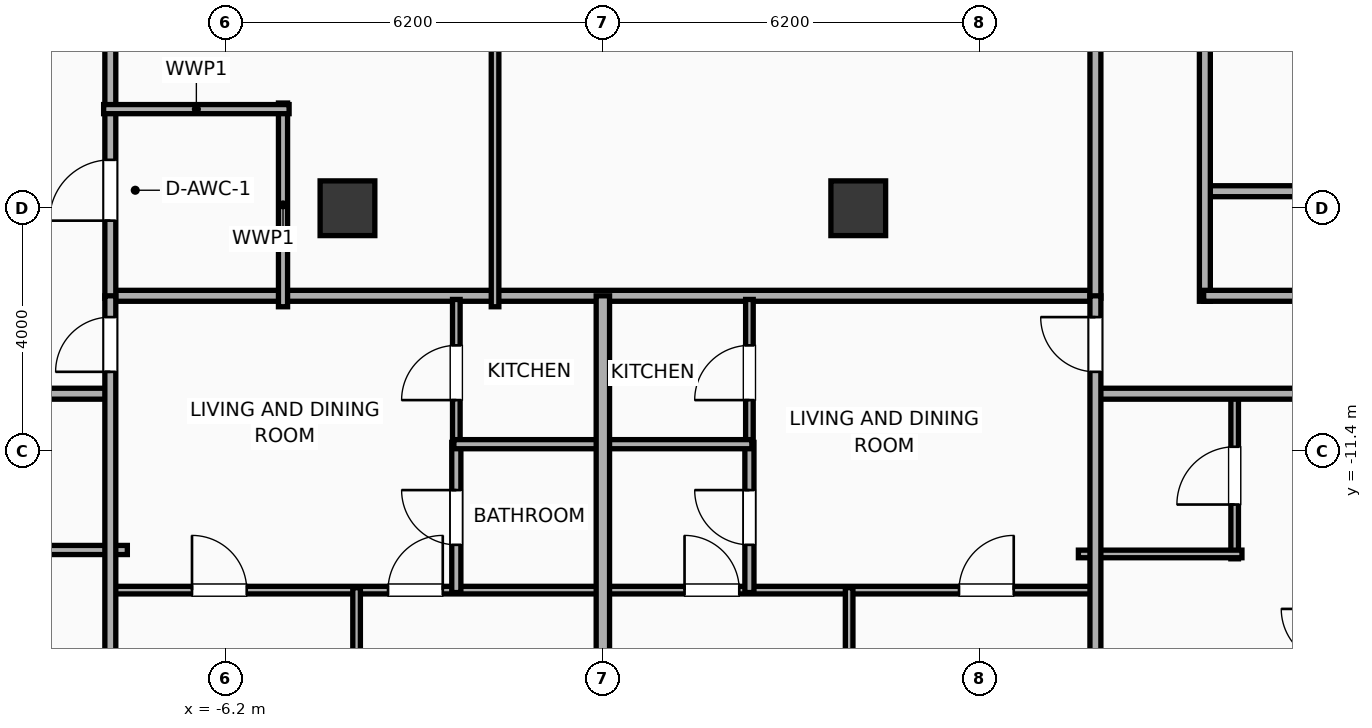
"""IFC4 building model, lengths in metres.
Left out: names, types, materials, properties, quantities, classifications, styles, units other than length and angle.
Written with IfcOpenShell. Run it as: python <this file> out.ifc"""

import sys

from ifc_helpers import new_model, si_unit, direction, frame, frame_2d, origin, origin_2d, place, context, subcontext, project, spatial, rectangle, extrude, element, fill, save


model = new_model("IFC4")
c1 = context("Model", 3, precision=1e-05, world=origin(), true_north=direction((0.0, 1.0)))
c2 = subcontext(c1, "Body", "Model", "MODEL_VIEW")
j1 = project(units=[si_unit("LENGTHUNIT", "METRE"), si_unit("PLANEANGLEUNIT", "RADIAN")], contexts=[c1])
p1 = place(None, origin())
s1 = spatial("IfcSite", under=j1, at=p1, CompositionType="ELEMENT")
p2 = place(p1, origin())
s2 = spatial("IfcBuilding", under=s1, at=p2, CompositionType="ELEMENT")
p3 = place(p2, frame((0.0, 0.0, 239.2)))
s3 = spatial("IfcBuildingStorey", under=s2, at=p3, CompositionType="ELEMENT", Elevation=239.2)
for number, where, z_axis, x_axis in (
    (1, (-4.2, -7.4, 0.0), (0.0, 0.0, 1.0), (1.0, 0.0, 0.0)),
    (2, (4.2, -7.4, 0.0), (0.0, 0.0, 1.0), (1.0, 0.0, 0.0)),
):
    element("IfcColumn", number, at=place(p3, frame(where, z_axis=z_axis, x_axis=x_axis)), inside=s3, PredefinedType="COLUMN", context=c2, shape_type="SweptSolid", body=[
        extrude(rectangle(XDim=0.9, YDim=0.9, at=origin_2d()), origin(), (0.0, 0.0, 1.0), 3.9),
    ])
p4 = place(p3, frame((9.88, -7.12, 0.0), z_axis=(0.0, 0.0, 1.0), x_axis=(1.0, 0.0, 0.0)))
e3 = element("IfcWall", 3, at=p4, inside=s3, PredefinedType="PARTITIONING", context=c2, shape_type="SweptSolid", body=[
    extrude(rectangle(XDim=2.27, YDim=0.18, at=frame_2d((1.135, 0.0))), origin(), (0.0, 0.0, 1.0), 3.65),
])
p5 = place(p3, frame((9.9, -8.93, 0.0), z_axis=(0.0, 0.0, 1.0), x_axis=(0.0, 1.0, 0.0)))
e4 = element("IfcWall", 4, at=p5, inside=s3, PredefinedType="PARTITIONING", context=c2, shape_type="SweptSolid", body=[
    extrude(rectangle(XDim=17.86, YDim=0.18, at=frame_2d((8.93, 0.0))), origin(), (0.0, 0.0, 1.0), 3.65),
])
p6 = place(p5, frame((7.487, 0.0, 0.0)))
e5 = element("IfcOpeningElement", 5, at=p6, cuts=e4, PredefinedType="OPENING", context=c2, shape_type="SweptSolid", body=[
    extrude(rectangle(XDim=1.1, YDim=2.05, at=frame_2d((0.55, 1.025))), frame((0.0, 0.1, 0.0), z_axis=(0.0, -1.0, 0.0), x_axis=(1.0, 0.0, 0.0)), (0.0, 0.0, 1.0), 0.2),
])
p7 = place(p3, frame((9.88, -8.84, 0.0), z_axis=(0.0, 0.0, 1.0), x_axis=(1.0, 0.0, 0.0)))
e6 = element("IfcWall", 6, at=p7, inside=s3, PredefinedType="PARTITIONING", context=c2, shape_type="SweptSolid", body=[
    extrude(rectangle(XDim=20.35, YDim=0.18, at=frame_2d((10.175, 0.0))), origin(), (0.0, 0.0, 1.0), 3.65),
])
p8 = place(p3, frame((-8.15, -8.84, 0.0), z_axis=(0.0, 0.0, 1.0), x_axis=(1.0, 0.0, 0.0)))
e7 = element("IfcWall", 7, at=p8, inside=s3, PredefinedType="PARTITIONING", context=c2, shape_type="SweptSolid", body=[
    extrude(rectangle(XDim=16.3, YDim=0.18, at=frame_2d((8.15, 0.0))), origin(), (0.0, 0.0, 1.0), 3.65),
])
p9 = place(p3, frame((-8.1, -8.88, 0.0), z_axis=(0.0, 0.0, 1.0), x_axis=(0.0, 1.0, 0.0)))
e8 = element("IfcWall", 8, at=p9, inside=s3, PredefinedType="PARTITIONING", context=c2, shape_type="SweptSolid", body=[
    extrude(rectangle(XDim=17.76, YDim=0.18, at=frame_2d((8.88, 0.0))), origin(), (0.0, 0.0, 1.0), 3.65),
])
p10 = place(p9, frame((1.276, 0.0, 0.0)))
e9 = element("IfcOpeningElement", 9, at=p10, cuts=e8, PredefinedType="OPENING", context=c2, shape_type="SweptSolid", body=[
    extrude(rectangle(XDim=1.0, YDim=2.05, at=frame_2d((0.5, 1.025))), frame((0.0, 0.1, 0.0), z_axis=(0.0, -1.0, 0.0), x_axis=(1.0, 0.0, 0.0)), (0.0, 0.0, 1.0), 0.2),
])
p11 = place(p9, frame((10.181, 0.0, 0.0)))
e10 = element("IfcOpeningElement", 10, at=p11, cuts=e8, PredefinedType="OPENING", context=c2, shape_type="SweptSolid", body=[
    extrude(rectangle(XDim=0.95, YDim=2.05, at=frame_2d((0.475, 1.025))), frame((0.0, 0.1, 0.0), z_axis=(0.0, -1.0, 0.0), x_axis=(1.0, 0.0, 0.0)), (0.0, 0.0, 1.0), 0.2),
])
p12 = place(p3, frame((8.1, -8.88, 0.0), z_axis=(0.0, 0.0, 1.0), x_axis=(0.0, 1.0, 0.0)))
e11 = element("IfcWall", 11, at=p12, inside=s3, PredefinedType="PARTITIONING", context=c2, shape_type="SweptSolid", body=[
    extrude(rectangle(XDim=17.76, YDim=0.18, at=frame_2d((8.88, 0.0))), origin(), (0.0, 0.0, 1.0), 3.65),
])
p13 = place(p3, frame((-5.26, -9.02, 0.0), z_axis=(0.0, 0.0, 1.0), x_axis=(0.0, 1.0, 0.0)))
e12 = element("IfcWall", 12, at=p13, inside=s3, PredefinedType="PLUMBINGWALL", context=c2, shape_type="SweptSolid", body=[
    extrude(rectangle(XDim=3.35, YDim=0.15, at=frame_2d((1.675, 0.0))), origin(), (0.0, 0.0, 1.0), 3.65),
])
p14 = place(p3, frame((-8.21, -5.77, 0.0), z_axis=(0.0, 0.0, 1.0), x_axis=(1.0, 0.0, 0.0)))
e13 = element("IfcWall", 13, at=p14, inside=s3, PredefinedType="PLUMBINGWALL", context=c2, shape_type="SweptSolid", body=[
    extrude(rectangle(XDim=3.05, YDim=0.15, at=frame_2d((1.525, 0.0))), origin(), (0.0, 0.0, 1.0), 3.65),
])
p15 = place(p3, frame((-1.773, -9.02, 0.0), z_axis=(0.0, 0.0, 1.0), x_axis=(0.0, 1.0, 0.0)))
e14 = element("IfcWall", 14, at=p15, inside=s3, PredefinedType="PARTITIONING", context=c2, shape_type="SweptSolid", body=[
    extrude(rectangle(XDim=17.99, YDim=0.125, at=frame_2d((8.995, 0.0))), origin(), (0.0, 0.0, 1.0), 3.65),
])
p16 = place(p15, frame((8.52, 0.0, 0.0)))
e15 = element("IfcOpeningElement", 15, at=p16, cuts=e14, PredefinedType="OPENING", context=c2, shape_type="SweptSolid", body=[
    extrude(rectangle(XDim=0.95, YDim=2.05, at=frame_2d((0.475, 1.025))), frame((0.0, 0.073, 0.0), z_axis=(0.0, -1.0, 0.0), x_axis=(1.0, 0.0, 0.0)), (0.0, 0.0, 1.0), 0.145),
])
p17 = place(p3, frame((-10.217, -13.02, 0.0), z_axis=(0.0, 0.0, 1.0), x_axis=(1.0, 0.0, 0.0)))
e16 = element("IfcWall", 16, at=p17, inside=s3, PredefinedType="PLUMBINGWALL", context=c2, shape_type="SweptSolid", body=[
    extrude(rectangle(XDim=2.397, YDim=0.15, at=frame_2d((1.198, 0.0))), origin(), (0.0, 0.0, 1.0), 3.65),
])
p18 = place(p3, frame((10.39, -13.165, 0.0), z_axis=(0.0, 0.0, 1.0), x_axis=(0.0, 1.0, 0.0)))
e17 = element("IfcWall", 17, at=p18, inside=s3, PredefinedType="PARTITIONING", context=c2, shape_type="SweptSolid", body=[
    extrude(rectangle(XDim=2.735, YDim=0.125, at=frame_2d((1.368, 0.0))), origin(), (0.0, 0.0, 1.0), 3.65),
])
p19 = place(p18, frame((0.893, 0.0, 0.0)))
e18 = element("IfcOpeningElement", 18, at=p19, cuts=e17, PredefinedType="OPENING", context=c2, shape_type="SweptSolid", body=[
    extrude(rectangle(XDim=0.95, YDim=2.05, at=frame_2d((0.475, 1.025))), frame((0.0, 0.073, 0.0), z_axis=(0.0, -1.0, 0.0), x_axis=(1.0, 0.0, 0.0)), (0.0, 0.0, 1.0), 0.145),
])
p20 = place(p3, frame((7.82, -13.085, 0.0), z_axis=(0.0, 0.0, 1.0), x_axis=(1.0, 0.0, 0.0)))
e19 = element("IfcWall", 19, at=p20, inside=s3, PredefinedType="PARTITIONING", context=c2, shape_type="SweptSolid", body=[
    extrude(rectangle(XDim=2.69, YDim=0.125, at=frame_2d((1.345, 0.0))), origin(), (0.0, 0.0, 1.0), 3.65),
])
p21 = place(p3, frame((-26.23, -10.45, 0.0), z_axis=(0.0, 0.0, 1.0), x_axis=(1.0, 0.0, 0.0)))
e20 = element("IfcWall", 20, at=p21, inside=s3, PredefinedType="PARTITIONING", context=c2, shape_type="SweptSolid", body=[
    extrude(rectangle(XDim=18.15, YDim=0.18, at=frame_2d((9.075, 0.0))), origin(), (0.0, 0.0, 1.0), 3.65),
])
p22 = place(p21, frame((2.659, 0.0, 0.0)))
e21 = element("IfcOpeningElement", 21, at=p22, cuts=e20, PredefinedType="OPENING", context=c2, shape_type="SweptSolid", body=[
    extrude(rectangle(XDim=0.9, YDim=2.05, at=frame_2d((0.45, 1.025))), frame((0.0, 0.1, 0.0), z_axis=(0.0, -1.0, 0.0), x_axis=(1.0, 0.0, 0.0)), (0.0, 0.0, 1.0), 0.2),
])
p23 = place(p21, frame((9.571, 0.0, 0.0)))
e22 = element("IfcOpeningElement", 22, at=p23, cuts=e20, PredefinedType="OPENING", context=c2, shape_type="SweptSolid", body=[
    extrude(rectangle(XDim=1.15, YDim=2.05, at=frame_2d((0.575, 1.025))), frame((0.0, 0.1, 0.0), z_axis=(0.0, -1.0, 0.0), x_axis=(1.0, 0.0, 0.0)), (0.0, 0.0, 1.0), 0.2),
])
p24 = place(p21, frame((14.792, 0.0, 0.0)))
e23 = element("IfcOpeningElement", 23, at=p24, cuts=e20, PredefinedType="OPENING", context=c2, shape_type="SweptSolid", body=[
    extrude(rectangle(XDim=0.9, YDim=2.05, at=frame_2d((0.45, 1.025))), frame((0.0, 0.1, 0.0), z_axis=(0.0, -1.0, 0.0), x_axis=(1.0, 0.0, 0.0)), (0.0, 0.0, 1.0), 0.2),
])
p25 = place(p3, frame((8.08, -10.45, 0.0), z_axis=(0.0, 0.0, 1.0), x_axis=(1.0, 0.0, 0.0)))
e24 = element("IfcWall", 24, at=p25, inside=s3, PredefinedType="PARTITIONING", context=c2, shape_type="SweptSolid", body=[
    extrude(rectangle(XDim=22.15, YDim=0.18, at=frame_2d((11.075, 0.0))), origin(), (0.0, 0.0, 1.0), 3.65),
])
p26 = place(p25, frame((3.283, 0.0, 0.0)))
e25 = element("IfcOpeningElement", 25, at=p26, cuts=e24, PredefinedType="OPENING", context=c2, shape_type="SweptSolid", body=[
    extrude(rectangle(XDim=1.15, YDim=2.05, at=frame_2d((0.575, 1.025))), frame((0.0, 0.1, 0.0), z_axis=(0.0, -1.0, 0.0), x_axis=(1.0, 0.0, 0.0)), (0.0, 0.0, 1.0), 0.2),
])
p27 = place(p25, frame((10.668, 0.0, 0.0)))
e26 = element("IfcOpeningElement", 26, at=p27, cuts=e24, PredefinedType="OPENING", context=c2, shape_type="SweptSolid", body=[
    extrude(rectangle(XDim=1.15, YDim=2.05, at=frame_2d((0.575, 1.025))), frame((0.0, 0.1, 0.0), z_axis=(0.0, -1.0, 0.0), x_axis=(1.0, 0.0, 0.0)), (0.0, 0.0, 1.0), 0.2),
])
p28 = place(p25, frame((18.084, 0.0, 0.0)))
e27 = element("IfcOpeningElement", 27, at=p28, cuts=e24, PredefinedType="OPENING", context=c2, shape_type="SweptSolid", body=[
    extrude(rectangle(XDim=1.15, YDim=2.05, at=frame_2d((0.575, 1.025))), frame((0.0, 0.1, 0.0), z_axis=(0.0, -1.0, 0.0), x_axis=(1.0, 0.0, 0.0)), (0.0, 0.0, 1.0), 0.2),
])
p29 = place(p3, frame((-8.08, -13.68, 0.0), z_axis=(0.0, 0.0, 1.0), x_axis=(1.0, 0.0, 0.0)))
e28 = element("IfcWall", 28, at=p29, inside=s3, PredefinedType="PARTITIONING", context=c2, shape_type="SweptSolid", body=[
    extrude(rectangle(XDim=8.06, YDim=0.125, at=frame_2d((4.03, 0.0))), origin(), (0.0, 0.0, 1.0), 3.65),
])
p30 = place(p29, frame((1.323, 0.0, 0.0)))
e29 = element("IfcOpeningElement", 29, at=p30, cuts=e28, PredefinedType="OPENING", context=c2, shape_type="SweptSolid", body=[
    extrude(rectangle(XDim=0.9, YDim=2.05, at=frame_2d((0.45, 1.025))), frame((0.0, 0.073, 0.0), z_axis=(0.0, -1.0, 0.0), x_axis=(1.0, 0.0, 0.0)), (0.0, 0.0, 1.0), 0.145),
])
p31 = place(p29, frame((4.547, 0.0, 0.0)))
e30 = element("IfcOpeningElement", 30, at=p31, cuts=e28, PredefinedType="OPENING", context=c2, shape_type="SweptSolid", body=[
    extrude(rectangle(XDim=0.9, YDim=2.05, at=frame_2d((0.45, 1.025))), frame((0.0, 0.073, 0.0), z_axis=(0.0, -1.0, 0.0), x_axis=(1.0, 0.0, 0.0)), (0.0, 0.0, 1.0), 0.145),
])
p32 = place(p3, frame((-2.41, -11.31, 0.0), z_axis=(0.0, 0.0, 1.0), x_axis=(0.0, 1.0, 0.0)))
e31 = element("IfcWall", 31, at=p32, inside=s3, PredefinedType="PARTITIONING", context=c2, shape_type="SweptSolid", body=[
    extrude(rectangle(XDim=2.41, YDim=0.125, at=frame_2d((1.205, 0.0))), origin(), (0.0, 0.0, 1.0), 3.65),
])
p33 = place(p32, frame((0.755, 0.0, 0.0)))
e32 = element("IfcOpeningElement", 32, at=p33, cuts=e31, PredefinedType="OPENING", context=c2, shape_type="SweptSolid", body=[
    extrude(rectangle(XDim=0.9, YDim=2.05, at=frame_2d((0.45, 1.025))), frame((0.0, 0.073, 0.0), z_axis=(0.0, -1.0, 0.0), x_axis=(1.0, 0.0, 0.0)), (0.0, 0.0, 1.0), 0.145),
])
p34 = place(p3, frame((-2.41, -13.72, 0.0), z_axis=(0.0, 0.0, 1.0), x_axis=(0.0, 1.0, 0.0)))
e33 = element("IfcWall", 33, at=p34, inside=s3, PredefinedType="PLUMBINGWALL", context=c2, shape_type="SweptSolid", body=[
    extrude(rectangle(XDim=2.47, YDim=0.15, at=frame_2d((1.235, 0.0))), origin(), (0.0, 0.0, 1.0), 3.65),
])
p35 = place(p34, frame((0.785, 0.0, 0.0)))
e34 = element("IfcOpeningElement", 34, at=p35, cuts=e33, PredefinedType="OPENING", context=c2, shape_type="SweptSolid", body=[
    extrude(rectangle(XDim=0.9, YDim=2.05, at=frame_2d((0.45, 1.025))), frame((0.0, 0.085, 0.0), z_axis=(0.0, -1.0, 0.0), x_axis=(1.0, 0.0, 0.0)), (0.0, 0.0, 1.0), 0.17),
])
p36 = place(p3, frame((-2.45, -11.28, 0.0), z_axis=(0.0, 0.0, 1.0), x_axis=(1.0, 0.0, 0.0)))
e35 = element("IfcWall", 35, at=p36, inside=s3, PredefinedType="PLUMBINGWALL", context=c2, shape_type="SweptSolid", body=[
    extrude(rectangle(XDim=2.43, YDim=0.15, at=frame_2d((1.215, 0.0))), origin(), (0.0, 0.0, 1.0), 3.65),
])
p37 = place(p3, frame((-4.05, -18.83, 0.0), z_axis=(0.0, 0.0, 1.0), x_axis=(0.0, 1.0, 0.0)))
e36 = element("IfcWall", 36, at=p37, inside=s3, PredefinedType="PARTITIONING", context=c2, shape_type="SweptSolid", body=[
    extrude(rectangle(XDim=5.19, YDim=0.125, at=frame_2d((2.595, 0.0))), origin(), (0.0, 0.0, 1.0), 3.65),
])
p38 = place(p3, frame((-8.1, -18.83, 0.0), z_axis=(0.0, 0.0, 1.0), x_axis=(0.0, 1.0, 0.0)))
e37 = element("IfcWall", 37, at=p38, inside=s3, PredefinedType="PARTITIONING", context=c2, shape_type="SweptSolid", body=[
    extrude(rectangle(XDim=9.99, YDim=0.18, at=frame_2d((4.995, 0.0))), origin(), (0.0, 0.0, 1.0), 3.65),
])
p39 = place(p38, frame((8.74, 0.0, 0.0)))
e38 = element("IfcOpeningElement", 38, at=p39, cuts=e37, PredefinedType="OPENING", context=c2, shape_type="SweptSolid", body=[
    extrude(rectangle(XDim=0.9, YDim=2.05, at=frame_2d((0.45, 1.025))), frame((0.0, 0.1, 0.0), z_axis=(0.0, -1.0, 0.0), x_axis=(1.0, 0.0, 0.0)), (0.0, 0.0, 1.0), 0.2),
])
p40 = place(p3, frame((0.02, -13.68, 0.0), z_axis=(0.0, 0.0, 1.0), x_axis=(1.0, 0.0, 0.0)))
e39 = element("IfcWall", 39, at=p40, inside=s3, PredefinedType="PARTITIONING", context=c2, shape_type="SweptSolid", body=[
    extrude(rectangle(XDim=8.06, YDim=0.125, at=frame_2d((4.03, 0.0))), origin(), (0.0, 0.0, 1.0), 3.65),
])
p41 = place(p40, frame((1.323, 0.0, 0.0)))
e40 = element("IfcOpeningElement", 40, at=p41, cuts=e39, PredefinedType="OPENING", context=c2, shape_type="SweptSolid", body=[
    extrude(rectangle(XDim=0.9, YDim=2.05, at=frame_2d((0.45, 1.025))), frame((0.0, 0.073, 0.0), z_axis=(0.0, -1.0, 0.0), x_axis=(1.0, 0.0, 0.0)), (0.0, 0.0, 1.0), 0.145),
])
p42 = place(p40, frame((5.837, 0.0, 0.0)))
e41 = element("IfcOpeningElement", 41, at=p42, cuts=e39, PredefinedType="OPENING", context=c2, shape_type="SweptSolid", body=[
    extrude(rectangle(XDim=0.9, YDim=2.05, at=frame_2d((0.45, 1.025))), frame((0.0, 0.073, 0.0), z_axis=(0.0, -1.0, 0.0), x_axis=(1.0, 0.0, 0.0)), (0.0, 0.0, 1.0), 0.145),
])
p43 = place(p3, frame((2.41, -11.31, 0.0), z_axis=(0.0, 0.0, 1.0), x_axis=(0.0, 1.0, 0.0)))
e42 = element("IfcWall", 42, at=p43, inside=s3, PredefinedType="PARTITIONING", context=c2, shape_type="SweptSolid", body=[
    extrude(rectangle(XDim=2.41, YDim=0.125, at=frame_2d((1.205, 0.0))), origin(), (0.0, 0.0, 1.0), 3.65),
])
p44 = place(p43, frame((0.755, 0.0, 0.0)))
e43 = element("IfcOpeningElement", 43, at=p44, cuts=e42, PredefinedType="OPENING", context=c2, shape_type="SweptSolid", body=[
    extrude(rectangle(XDim=0.9, YDim=2.05, at=frame_2d((0.45, 1.025))), frame((0.0, 0.073, 0.0), z_axis=(0.0, -1.0, 0.0), x_axis=(1.0, 0.0, 0.0)), (0.0, 0.0, 1.0), 0.145),
])
p45 = place(p3, frame((2.41, -13.72, 0.0), z_axis=(0.0, 0.0, 1.0), x_axis=(0.0, 1.0, 0.0)))
e44 = element("IfcWall", 44, at=p45, inside=s3, PredefinedType="PLUMBINGWALL", context=c2, shape_type="SweptSolid", body=[
    extrude(rectangle(XDim=2.47, YDim=0.15, at=frame_2d((1.235, 0.0))), origin(), (0.0, 0.0, 1.0), 3.65),
])
p46 = place(p45, frame((0.785, 0.0, 0.0)))
e45 = element("IfcOpeningElement", 45, at=p46, cuts=e44, PredefinedType="OPENING", context=c2, shape_type="SweptSolid", body=[
    extrude(rectangle(XDim=0.9, YDim=2.05, at=frame_2d((0.45, 1.025))), frame((0.0, 0.085, 0.0), z_axis=(0.0, -1.0, 0.0), x_axis=(1.0, 0.0, 0.0)), (0.0, 0.0, 1.0), 0.17),
])
p47 = place(p3, frame((0.02, -11.28, 0.0), z_axis=(0.0, 0.0, 1.0), x_axis=(1.0, 0.0, 0.0)))
e46 = element("IfcWall", 46, at=p47, inside=s3, PredefinedType="PLUMBINGWALL", context=c2, shape_type="SweptSolid", body=[
    extrude(rectangle(XDim=2.43, YDim=0.15, at=frame_2d((1.215, 0.0))), origin(), (0.0, 0.0, 1.0), 3.65),
])
p48 = place(p3, frame((4.05, -18.83, 0.0), z_axis=(0.0, 0.0, 1.0), x_axis=(0.0, 1.0, 0.0)))
e47 = element("IfcWall", 47, at=p48, inside=s3, PredefinedType="PARTITIONING", context=c2, shape_type="SweptSolid", body=[
    extrude(rectangle(XDim=5.19, YDim=0.125, at=frame_2d((2.595, 0.0))), origin(), (0.0, 0.0, 1.0), 3.65),
])
p49 = place(p3, frame((8.1, -18.83, 0.0), z_axis=(0.0, 0.0, 1.0), x_axis=(0.0, 1.0, 0.0)))
e48 = element("IfcWall", 48, at=p49, inside=s3, PredefinedType="PARTITIONING", context=c2, shape_type="SweptSolid", body=[
    extrude(rectangle(XDim=9.99, YDim=0.18, at=frame_2d((4.995, 0.0))), origin(), (0.0, 0.0, 1.0), 3.65),
])
p50 = place(p49, frame((8.74, 0.0, 0.0)))
e49 = element("IfcOpeningElement", 49, at=p50, cuts=e48, PredefinedType="OPENING", context=c2, shape_type="SweptSolid", body=[
    extrude(rectangle(XDim=0.9, YDim=2.05, at=frame_2d((0.45, 1.025))), frame((0.0, 0.1, 0.0), z_axis=(0.0, -1.0, 0.0), x_axis=(1.0, 0.0, 0.0)), (0.0, 0.0, 1.0), 0.2),
])
p51 = place(p3, frame((0.0, -18.83, 0.0), z_axis=(0.0, 0.0, 1.0), x_axis=(0.0, 1.0, 0.0)))
e50 = element("IfcWall", 50, at=p51, inside=s3, PredefinedType="PARTITIONING", context=c2, shape_type="SweptSolid", body=[
    extrude(rectangle(XDim=9.99, YDim=0.22, at=frame_2d((4.995, 0.0))), origin(), (0.0, 0.0, 1.0), 3.65),
])
p52 = place(p10, origin())
e51 = element("IfcDoor", 51, at=p52, inside=s3, OperationType="SINGLE_SWING_LEFT", PredefinedType="DOOR", context=c2, shape_type="SweptSolid", body=[
    extrude(rectangle(XDim=1.0, YDim=2.05, at=frame_2d((0.5, 1.025))), frame((0.0, 0.025, 0.0), z_axis=(0.0, -1.0, 0.0), x_axis=(1.0, 0.0, 0.0)), (0.0, 0.0, 1.0), 0.05),
])
fill(e9, e51)
p53 = place(p19, origin())
e52 = element("IfcDoor", 52, at=p53, inside=s3, OperationType="SINGLE_SWING_LEFT", PredefinedType="DOOR", context=c2, shape_type="SweptSolid", body=[
    extrude(rectangle(XDim=0.95, YDim=2.05, at=frame_2d((0.475, 1.025))), frame((0.0, 0.025, 0.0), z_axis=(0.0, -1.0, 0.0), x_axis=(1.0, 0.0, 0.0)), (0.0, 0.0, 1.0), 0.05),
])
fill(e18, e52)
p54 = place(p30, origin())
e53 = element("IfcDoor", 53, at=p54, inside=s3, OperationType="SINGLE_SWING_LEFT", PredefinedType="DOOR", context=c2, shape_type="SweptSolid", body=[
    extrude(rectangle(XDim=0.9, YDim=2.05, at=frame_2d((0.45, 1.025))), frame((0.0, 0.025, 0.0), z_axis=(0.0, -1.0, 0.0), x_axis=(1.0, 0.0, 0.0)), (0.0, 0.0, 1.0), 0.05),
])
fill(e29, e53)
p55 = place(p31, origin())
e54 = element("IfcDoor", 54, at=p55, inside=s3, OperationType="SINGLE_SWING_RIGHT", PredefinedType="DOOR", context=c2, shape_type="SweptSolid", body=[
    extrude(rectangle(XDim=0.9, YDim=2.05, at=frame_2d((0.45, 1.025))), frame((0.0, 0.025, 0.0), z_axis=(0.0, -1.0, 0.0), x_axis=(1.0, 0.0, 0.0)), (0.0, 0.0, 1.0), 0.05),
])
fill(e30, e54)
p56 = place(p33, origin())
e55 = element("IfcDoor", 55, at=p56, inside=s3, OperationType="SINGLE_SWING_LEFT", PredefinedType="DOOR", context=c2, shape_type="SweptSolid", body=[
    extrude(rectangle(XDim=0.9, YDim=2.05, at=frame_2d((0.45, 1.025))), frame((0.0, 0.025, 0.0), z_axis=(0.0, -1.0, 0.0), x_axis=(1.0, 0.0, 0.0)), (0.0, 0.0, 1.0), 0.05),
])
fill(e32, e55)
p57 = place(p35, origin())
e56 = element("IfcDoor", 56, at=p57, inside=s3, OperationType="SINGLE_SWING_RIGHT", PredefinedType="DOOR", context=c2, shape_type="SweptSolid", body=[
    extrude(rectangle(XDim=0.9, YDim=2.05, at=frame_2d((0.45, 1.025))), frame((0.0, 0.025, 0.0), z_axis=(0.0, -1.0, 0.0), x_axis=(1.0, 0.0, 0.0)), (0.0, 0.0, 1.0), 0.05),
])
fill(e34, e56)
p58 = place(p39, origin())
e57 = element("IfcDoor", 57, at=p58, inside=s3, OperationType="SINGLE_SWING_LEFT", PredefinedType="DOOR", context=c2, shape_type="SweptSolid", body=[
    extrude(rectangle(XDim=0.9, YDim=2.05, at=frame_2d((0.45, 1.025))), frame((0.0, 0.025, 0.0), z_axis=(0.0, -1.0, 0.0), x_axis=(1.0, 0.0, 0.0)), (0.0, 0.0, 1.0), 0.05),
])
fill(e38, e57)
p59 = place(p41, origin())
e58 = element("IfcDoor", 58, at=p59, inside=s3, OperationType="SINGLE_SWING_LEFT", PredefinedType="DOOR", context=c2, shape_type="SweptSolid", body=[
    extrude(rectangle(XDim=0.9, YDim=2.05, at=frame_2d((0.45, 1.025))), frame((0.0, 0.025, 0.0), z_axis=(0.0, -1.0, 0.0), x_axis=(1.0, 0.0, 0.0)), (0.0, 0.0, 1.0), 0.05),
])
fill(e40, e58)
p60 = place(p42, origin())
e59 = element("IfcDoor", 59, at=p60, inside=s3, OperationType="SINGLE_SWING_RIGHT", PredefinedType="DOOR", context=c2, shape_type="SweptSolid", body=[
    extrude(rectangle(XDim=0.9, YDim=2.05, at=frame_2d((0.45, 1.025))), frame((0.0, 0.025, 0.0), z_axis=(0.0, -1.0, 0.0), x_axis=(1.0, 0.0, 0.0)), (0.0, 0.0, 1.0), 0.05),
])
fill(e41, e59)
p61 = place(p44, origin())
e60 = element("IfcDoor", 60, at=p61, inside=s3, OperationType="SINGLE_SWING_LEFT", PredefinedType="DOOR", context=c2, shape_type="SweptSolid", body=[
    extrude(rectangle(XDim=0.9, YDim=2.05, at=frame_2d((0.45, 1.025))), frame((0.0, 0.025, 0.0), z_axis=(0.0, -1.0, 0.0), x_axis=(1.0, 0.0, 0.0)), (0.0, 0.0, 1.0), 0.05),
])
fill(e43, e60)
p62 = place(p46, origin())
e61 = element("IfcDoor", 61, at=p62, inside=s3, OperationType="SINGLE_SWING_RIGHT", PredefinedType="DOOR", context=c2, shape_type="SweptSolid", body=[
    extrude(rectangle(XDim=0.9, YDim=2.05, at=frame_2d((0.45, 1.025))), frame((0.0, 0.025, 0.0), z_axis=(0.0, -1.0, 0.0), x_axis=(1.0, 0.0, 0.0)), (0.0, 0.0, 1.0), 0.05),
])
fill(e45, e61)
p63 = place(p50, origin())
e62 = element("IfcDoor", 62, at=p63, inside=s3, OperationType="SINGLE_SWING_RIGHT", PredefinedType="DOOR", context=c2, shape_type="SweptSolid", body=[
    extrude(rectangle(XDim=0.9, YDim=2.05, at=frame_2d((0.45, 1.025))), frame((0.0, 0.025, 0.0), z_axis=(0.0, -1.0, 0.0), x_axis=(1.0, 0.0, 0.0)), (0.0, 0.0, 1.0), 0.05),
])
fill(e49, e62)
save(model, sys.argv[1])
